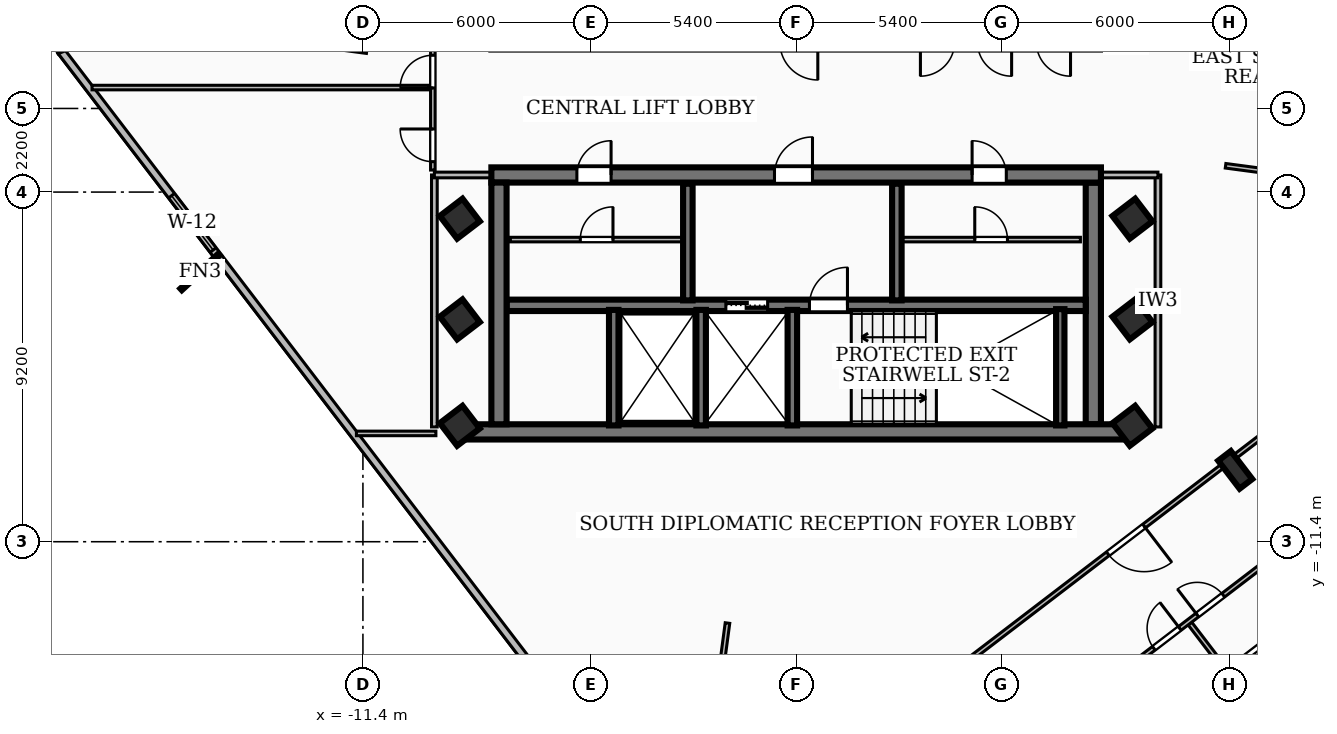
"""IFC4 building model, lengths in metres.
Left out: names, types, materials, properties, quantities, classifications, styles, units other than length and angle.
Written with IfcOpenShell. Run it as: python <this file> out.ifc"""

import sys

from ifc_helpers import new_model, si_unit, direction, frame, frame_2d, origin, origin_2d, place, context, subcontext, project, spatial, rectangle, i_section, extrude, element, fill, save


model = new_model("IFC4")
c1 = context("Model", 3, precision=1e-05, world=origin(), true_north=direction((0.0, 1.0)))
c2 = subcontext(c1, "Body", "Model", "MODEL_VIEW")
j1 = project(units=[si_unit("LENGTHUNIT", "METRE"), si_unit("PLANEANGLEUNIT", "RADIAN")], contexts=[c1])
p1 = place(None, origin())
s1 = spatial("IfcSite", under=j1, at=p1, CompositionType="ELEMENT")
p2 = place(p1, origin())
s2 = spatial("IfcBuilding", under=s1, at=p2, CompositionType="ELEMENT")
p3 = place(p2, frame((0.0, 0.0, 232.56)))
s3 = spatial("IfcBuildingStorey", under=s2, at=p3, CompositionType="ELEMENT", Elevation=232.56)
p4 = place(p3, frame((8.78, -8.51, 0.0), z_axis=(0.0, 0.0, 1.0), x_axis=(-1.0, 0.0, 0.0)))
e1 = element("IfcWall", 1, at=p4, inside=s3, PredefinedType="SHEAR", context=c2, shape_type="SweptSolid", body=[
    extrude(rectangle(XDim=17.56, YDim=0.4, at=frame_2d((8.78, 0.0))), origin(), (0.0, 0.0, 1.0), 3.14),
])
p5 = place(p3, frame((-8.02, -1.75, 0.0), z_axis=(0.0, 0.0, 1.0), x_axis=(1.0, 0.0, 0.0)))
e2 = element("IfcWall", 2, at=p5, inside=s3, PredefinedType="SHEAR", context=c2, shape_type="SweptSolid", body=[
    extrude(rectangle(XDim=16.04, YDim=0.4, at=frame_2d((8.02, 0.0))), origin(), (0.0, 0.0, 1.0), 3.14),
])
p6 = place(p5, frame((7.45, 0.0, 0.0)))
e3 = element("IfcOpeningElement", 3, at=p6, cuts=e2, PredefinedType="OPENING", context=c2, shape_type="SweptSolid", body=[
    extrude(rectangle(XDim=1.0, YDim=2.1, at=frame_2d((0.5, 1.05))), frame((0.0, 0.21, 0.0), z_axis=(0.0, -1.0, 0.0), x_axis=(1.0, 0.0, 0.0)), (0.0, 0.0, 1.0), 0.42),
])
p7 = place(p5, frame((12.65, 0.0, 0.0)))
e4 = element("IfcOpeningElement", 4, at=p7, cuts=e2, PredefinedType="OPENING", context=c2, shape_type="SweptSolid", body=[
    extrude(rectangle(XDim=0.9, YDim=2.06, at=frame_2d((0.45, 1.03))), frame((0.0, 0.21, 0.0), z_axis=(0.0, -1.0, 0.0), x_axis=(1.0, 0.0, 0.0)), (0.0, 0.0, 1.0), 0.42),
])
p8 = place(p5, frame((2.25, 0.0, 0.0)))
e5 = element("IfcOpeningElement", 5, at=p8, cuts=e2, PredefinedType="OPENING", context=c2, shape_type="SweptSolid", body=[
    extrude(rectangle(XDim=0.9, YDim=2.06, at=frame_2d((0.45, 1.03))), frame((0.0, 0.21, 0.0), z_axis=(0.0, -1.0, 0.0), x_axis=(1.0, 0.0, 0.0)), (0.0, 0.0, 1.0), 0.42),
])
for number, where, z_axis, x_axis in (
    (6, (-7.82, -8.31, 0.0), (0.0, 0.0, 1.0), (0.0, 1.0, 0.0)),
    (7, (7.82, -1.95, 0.0), (0.0, 0.0, 1.0), (0.0, -1.0, 0.0)),
):
    element("IfcWall", number, at=place(p3, frame(where, z_axis=z_axis, x_axis=x_axis)), inside=s3, PredefinedType="SHEAR", context=c2, shape_type="SweptSolid", body=[
        extrude(rectangle(XDim=6.36, YDim=0.4, at=frame_2d((3.18, 0.0))), origin(), (0.0, 0.0, 1.0), 3.14),
    ])
p9 = place(p3, frame((-7.62, -5.18, 0.0), z_axis=(0.0, 0.0, 1.0), x_axis=(1.0, 0.0, 0.0)))
e8 = element("IfcWall", 8, at=p9, inside=s3, PredefinedType="SOLIDWALL", context=c2, shape_type="SweptSolid", body=[
    extrude(rectangle(XDim=15.24, YDim=0.3, at=frame_2d((7.62, 0.0))), origin(), (0.0, 0.0, 1.0), 3.14),
])
p10 = place(p9, frame((5.77, 0.0, 0.0)))
e9 = element("IfcOpeningElement", 9, at=p10, cuts=e8, PredefinedType="OPENING", context=c2, shape_type="SweptSolid", body=[
    extrude(rectangle(XDim=1.1, YDim=2.15, at=frame_2d((0.55, 1.075))), frame((0.0, 0.16, 0.0), z_axis=(0.0, -1.0, 0.0), x_axis=(1.0, 0.0, 0.0)), (0.0, 0.0, 1.0), 0.32),
])
p11 = place(p9, frame((7.97, 0.0, 0.0)))
e10 = element("IfcOpeningElement", 10, at=p11, cuts=e8, PredefinedType="OPENING", context=c2, shape_type="SweptSolid", body=[
    extrude(rectangle(XDim=1.0, YDim=2.1, at=frame_2d((0.5, 1.05))), frame((0.0, 0.16, 0.0), z_axis=(0.0, -1.0, 0.0), x_axis=(1.0, 0.0, 0.0)), (0.0, 0.0, 1.0), 0.32),
])
p12 = place(p3, frame((6.95, -8.34, 0.0), z_axis=(0.0, 0.0, 1.0), x_axis=(0.0, 1.0, 0.0)))
e11 = element("IfcWall", 11, at=p12, inside=s3, PredefinedType="SOLIDWALL", context=c2, shape_type="SweptSolid", body=[
    extrude(rectangle(XDim=3.06, YDim=0.22, at=frame_2d((1.53, 0.0))), origin(), (0.0, 0.0, 1.0), 3.14),
])
for number, where, z_axis, x_axis in (
    (12, (-0.1, -8.34, 0.0), (0.0, 0.0, 1.0), (0.0, 1.0, 0.0)),
    (13, (-2.5, -8.34, 0.0), (0.0, 0.0, 1.0), (0.0, 1.0, 0.0)),
    (14, (-4.8, -8.34, 0.0), (0.0, 0.0, 1.0), (0.0, 1.0, 0.0)),
):
    element("IfcWall", number, at=place(p3, frame(where, z_axis=z_axis, x_axis=x_axis)), inside=s3, PredefinedType="SOLIDWALL", context=c2, shape_type="SweptSolid", body=[
        extrude(rectangle(XDim=3.04, YDim=0.25, at=frame_2d((1.52, 0.0))), origin(), (0.0, 0.0, 1.0), 3.14),
    ])
for number, where, z_axis, x_axis in (
    (15, (-2.85, -5.05, 0.0), (0.0, 0.0, 1.0), (0.0, 1.0, 0.0)),
    (16, (2.65, -5.05, 0.0), (0.0, 0.0, 1.0), (0.0, 1.0, 0.0)),
):
    element("IfcWall", number, at=place(p3, frame(where, z_axis=z_axis, x_axis=x_axis)), inside=s3, PredefinedType="SOLIDWALL", context=c2, shape_type="SweptSolid", body=[
        extrude(rectangle(XDim=3.07, YDim=0.25, at=frame_2d((1.535, 0.0))), origin(), (0.0, 0.0, 1.0), 3.14),
    ])
for number, where, z_axis, x_axis in (
    (17, (-8.85, -5.55, 0.0), (0.0, 0.0, 1.0), (0.794, 0.607, 0.0)),
    (18, (-8.85, -2.9, 0.0), (0.0, 0.0, 1.0), (0.794, 0.607, 0.0)),
    (19, (8.85, -5.55, 0.0), (0.0, 0.0, 1.0), (0.794, 0.607, 0.0)),
    (20, (8.85, -2.9, 0.0), (0.0, 0.0, 1.0), (0.794, 0.607, 0.0)),
    (21, (8.85, -8.35, 0.0), (0.0, 0.0, 1.0), (0.794, 0.607, 0.0)),
    (22, (-8.85, -8.35, 0.0), (0.0, 0.0, 1.0), (0.794, 0.607, 0.0)),
):
    element("IfcColumn", number, at=place(p3, frame(where, z_axis=z_axis, x_axis=x_axis)), inside=s3, PredefinedType="COLUMN", context=c2, shape_type="SweptSolid", body=[
        extrude(rectangle(XDim=0.75, YDim=0.75, at=origin_2d()), origin(), (0.0, 0.0, 1.0), 3.42),
    ])
p13 = place(p3, frame((11.554, -9.51, 0.0), z_axis=(0.0, 0.0, 1.0), x_axis=(0.794414620535, 0.607375839723, 0.0)))
e23 = element("IfcColumn", 23, at=p13, inside=s3, PredefinedType="COLUMN", context=c2, shape_type="SweptSolid", body=[
    extrude(i_section(OverallWidth=0.418, OverallDepth=0.927, WebThickness=0.019, FlangeThickness=0.032, at=origin_2d()), origin(), (0.0, 0.0, 1.0), 3.42),
])
p14 = place(p3, frame((-3.607, -19.074, 0.0), z_axis=(0.0, 0.0, 1.0), x_axis=(-0.607353275552, 0.794431871639, 0.0)))
e24 = element("IfcWall", 24, at=p14, inside=s3, PredefinedType="SOLIDWALL", context=c2, shape_type="SweptSolid", body=[
    extrude(rectangle(XDim=25.924, YDim=0.2, at=frame_2d((12.962, 0.0))), origin(), (0.0, 0.0, 1.0), 3.14),
])
p15 = place(p14, frame((19.321, 0.0, 0.85)))
e25 = element("IfcOpeningElement", 25, at=p15, cuts=e24, PredefinedType="OPENING", context=c2, shape_type="SweptSolid", body=[
    extrude(rectangle(XDim=1.8, YDim=1.6, at=frame_2d((0.9, 0.8))), frame((0.0, 0.11, 0.0), z_axis=(0.0, -1.0, 0.0), x_axis=(1.0, 0.0, 0.0)), (0.0, 0.0, 1.0), 0.22),
])
p16 = place(p3, frame((-19.327, 1.478, 0.0), z_axis=(0.0, 0.0, 1.0), x_axis=(-0.382171551451, 0.924091394431, 0.0)))
e26 = element("IfcWall", 26, at=p16, inside=s3, PredefinedType="SOLIDWALL", context=c2, shape_type="SweptSolid", body=[
    extrude(rectangle(XDim=0.837, YDim=0.2, at=frame_2d((0.419, 0.0))), origin(), (0.0, 0.0, 1.0), 3.14),
])
p17 = place(p3, frame((16.274, -13.363, 0.0), z_axis=(0.0, 0.0, 1.0), x_axis=(-0.794458044917, -0.607319038781, 0.0)))
e27 = element("IfcWall", 27, at=p17, inside=s3, PredefinedType="SOLIDWALL", context=c2, shape_type="SweptSolid", body=[
    extrude(rectangle(XDim=10.164, YDim=0.2, at=frame_2d((5.082, 0.0))), origin(), (0.0, 0.0, 1.0), 3.14),
])
p18 = place(p17, frame((6.878, 0.0, 0.85)))
e28 = element("IfcOpeningElement", 28, at=p18, cuts=e27, PredefinedType="OPENING", context=c2, shape_type="SweptSolid", body=[
    extrude(rectangle(XDim=2.1, YDim=2.0, at=frame_2d((1.05, 1.0))), frame((0.0, 0.11, 0.0), z_axis=(0.0, -1.0, 0.0), x_axis=(1.0, 0.0, 0.0)), (0.0, 0.0, 1.0), 0.22),
])
p19 = place(p3, frame((2.8, -3.45, 0.0), z_axis=(0.0, 0.0, 1.0), x_axis=(1.0, 0.0, 0.0)))
e29 = element("IfcWall", 29, at=p19, inside=s3, PredefinedType="PARTITIONING", context=c2, shape_type="SweptSolid", body=[
    extrude(rectangle(XDim=4.68, YDim=0.12, at=frame_2d((2.34, 0.0))), origin(), (0.0, 0.0, 1.0), 3.14),
])
p20 = place(p19, frame((1.9, 0.0, 0.0)))
e30 = element("IfcOpeningElement", 30, at=p20, cuts=e29, PredefinedType="OPENING", context=c2, shape_type="SweptSolid", body=[
    extrude(rectangle(XDim=0.86, YDim=2.04, at=frame_2d((0.43, 1.02))), frame((0.0, 0.07, 0.0), z_axis=(0.0, -1.0, 0.0), x_axis=(1.0, 0.0, 0.0)), (0.0, 0.0, 1.0), 0.14),
])
p21 = place(p3, frame((-7.52, -3.45, 0.0), z_axis=(0.0, 0.0, 1.0), x_axis=(1.0, 0.0, 0.0)))
e31 = element("IfcWall", 31, at=p21, inside=s3, PredefinedType="PARTITIONING", context=c2, shape_type="SweptSolid", body=[
    extrude(rectangle(XDim=4.54, YDim=0.12, at=frame_2d((2.27, 0.0))), origin(), (0.0, 0.0, 1.0), 3.14),
])
p22 = place(p21, frame((1.84, 0.0, 0.0)))
e32 = element("IfcOpeningElement", 32, at=p22, cuts=e31, PredefinedType="OPENING", context=c2, shape_type="SweptSolid", body=[
    extrude(rectangle(XDim=0.86, YDim=2.04, at=frame_2d((0.43, 1.02))), frame((0.0, 0.07, 0.0), z_axis=(0.0, -1.0, 0.0), x_axis=(1.0, 0.0, 0.0)), (0.0, 0.0, 1.0), 0.14),
])
p23 = place(p3, frame((-9.52, -8.38, 0.0), z_axis=(0.0, 0.0, 1.0), x_axis=(0.0, 1.0, 0.0)))
e33 = element("IfcWall", 33, at=p23, inside=s3, PredefinedType="PARTITIONING", context=c2, shape_type="SweptSolid", body=[
    extrude(rectangle(XDim=6.63, YDim=0.15, at=frame_2d((3.315, 0.0))), origin(), (0.0, 0.0, 1.0), 3.14),
])
p24 = place(p3, frame((-7.85, -1.75, 0.0), z_axis=(0.0, 0.0, 1.0), x_axis=(-1.0, 0.0, 0.0)))
e34 = element("IfcWall", 34, at=p24, inside=s3, PredefinedType="PARTITIONING", context=c2, shape_type="SweptSolid", body=[
    extrude(rectangle(XDim=1.67, YDim=0.15, at=frame_2d((0.835, 0.0))), origin(), (0.0, 0.0, 1.0), 2.37),
])
p25 = place(p3, frame((9.52, -8.38, 0.0), z_axis=(0.0, 0.0, 1.0), x_axis=(0.0, 1.0, 0.0)))
e35 = element("IfcWall", 35, at=p25, inside=s3, PredefinedType="PARTITIONING", context=c2, shape_type="SweptSolid", body=[
    extrude(rectangle(XDim=6.63, YDim=0.15, at=frame_2d((3.315, 0.0))), origin(), (0.0, 0.0, 1.0), 3.14),
])
p26 = place(p3, frame((7.85, -1.75, 0.0), z_axis=(0.0, 0.0, 1.0), x_axis=(1.0, 0.0, 0.0)))
e36 = element("IfcWall", 36, at=p26, inside=s3, PredefinedType="PARTITIONING", context=c2, shape_type="SweptSolid", body=[
    extrude(rectangle(XDim=1.67, YDim=0.15, at=frame_2d((0.835, 0.0))), origin(), (0.0, 0.0, 1.0), 2.37),
])
p27 = place(p3, frame((-18.528, 0.55, 0.0), z_axis=(0.0, 0.0, 1.0), x_axis=(1.0, 0.0, 0.0)))
e37 = element("IfcWall", 37, at=p27, inside=s3, PredefinedType="PARTITIONING", context=c2, shape_type="SweptSolid", body=[
    extrude(rectangle(XDim=8.868, YDim=0.12, at=frame_2d((4.434, 0.0))), origin(), (0.0, 0.0, 1.0), 3.14),
])
p28 = place(p3, frame((-11.571, -8.55, 0.0), z_axis=(0.0, 0.0, 1.0), x_axis=(1.0, 0.0, 0.0)))
e38 = element("IfcWall", 38, at=p28, inside=s3, PredefinedType="PARTITIONING", context=c2, shape_type="SweptSolid", body=[
    extrude(rectangle(XDim=2.091, YDim=0.12, at=frame_2d((1.045, 0.0))), origin(), (0.0, 0.0, 1.0), 3.14),
])
p29 = place(p3, frame((-9.56, -1.62, 0.0), z_axis=(0.0, 0.0, 1.0), x_axis=(0.0, 1.0, 0.0)))
e39 = element("IfcWall", 39, at=p29, inside=s3, PredefinedType="PARTITIONING", context=c2, shape_type="SweptSolid", body=[
    extrude(rectangle(XDim=3.24, YDim=0.12, at=frame_2d((1.62, 0.0))), origin(), (0.0, 0.0, 1.0), 3.14),
])
p30 = place(p29, frame((0.22, 0.0, 0.0)))
e40 = element("IfcOpeningElement", 40, at=p30, cuts=e39, PredefinedType="OPENING", context=c2, shape_type="SweptSolid", body=[
    extrude(rectangle(XDim=0.86, YDim=2.04, at=frame_2d((0.43, 1.02))), frame((0.0, 0.07, 0.0), z_axis=(0.0, -1.0, 0.0), x_axis=(1.0, 0.0, 0.0)), (0.0, 0.0, 1.0), 0.14),
])
p31 = place(p29, frame((2.16, 0.0, 0.0)))
e41 = element("IfcOpeningElement", 41, at=p31, cuts=e39, PredefinedType="OPENING", context=c2, shape_type="SweptSolid", body=[
    extrude(rectangle(XDim=0.86, YDim=2.04, at=frame_2d((0.43, 1.02))), frame((0.0, 0.07, 0.0), z_axis=(0.0, -1.0, 0.0), x_axis=(1.0, 0.0, 0.0)), (0.0, 0.0, 1.0), 0.14),
])
p32 = place(p3, frame((-11.3, 1.508, 0.0), z_axis=(0.0, 0.0, 1.0), x_axis=(-0.99121735818, 0.132242764804, 0.0)))
e42 = element("IfcWall", 42, at=p32, inside=s3, PredefinedType="PARTITIONING", context=c2, shape_type="SweptSolid", body=[
    extrude(rectangle(XDim=8.295, YDim=0.12, at=frame_2d((4.147, 0.0))), origin(), (0.0, 0.0, 1.0), 3.14),
])
p33 = place(p3, frame((-1.807, -13.54, 0.0), z_axis=(0.0, 0.0, 1.0), x_axis=(-0.132245865303, -0.991216944523, 0.0)))
e43 = element("IfcWall", 43, at=p33, inside=s3, PredefinedType="PARTITIONING", context=c2, shape_type="SweptSolid", body=[
    extrude(rectangle(XDim=6.035, YDim=0.12, at=frame_2d((3.018, 0.0))), origin(), (0.0, 0.0, 1.0), 3.14),
])
p34 = place(p3, frame((11.3, -1.508, 0.0), z_axis=(0.0, 0.0, 1.0), x_axis=(0.99121735818, -0.132242764804, 0.0)))
e44 = element("IfcWall", 44, at=p34, inside=s3, PredefinedType="PARTITIONING", context=c2, shape_type="SweptSolid", body=[
    extrude(rectangle(XDim=8.295, YDim=0.12, at=frame_2d((4.147, 0.0))), origin(), (0.0, 0.0, 1.0), 3.14),
])
p35 = place(p3, frame((17.012, 1.275, 0.0), z_axis=(0.0, 0.0, 1.0), x_axis=(-0.60728139249, 0.794486822003, 0.0)))
e45 = element("IfcWall", 45, at=p35, inside=s3, PredefinedType="PARTITIONING", context=c2, shape_type="SweptSolid", body=[
    extrude(rectangle(XDim=7.95, YDim=0.12, at=frame_2d((3.975, 0.0))), origin(), (0.0, 0.0, 1.0), 3.14),
])
p36 = place(p3, frame((17.068, -4.939, 0.0), z_axis=(0.0, 0.0, 1.0), x_axis=(-0.794433927634, -0.607350586255, 0.0)))
e46 = element("IfcWall", 46, at=p36, inside=s3, PredefinedType="PARTITIONING", context=c2, shape_type="SweptSolid", body=[
    extrude(rectangle(XDim=20.58, YDim=0.12, at=frame_2d((10.29, 0.0))), origin(), (0.0, 0.0, 1.0), 2.51),
])
p37 = place(p36, frame((9.96, 0.0, 0.0)))
e47 = element("IfcOpeningElement", 47, at=p37, cuts=e46, PredefinedType="OPENING", context=c2, shape_type="SweptSolid", body=[
    extrude(rectangle(XDim=1.2, YDim=2.1, at=frame_2d((0.6, 1.05))), frame((0.0, 0.07, 0.0), z_axis=(0.0, -1.0, 0.0), x_axis=(1.0, 0.0, 0.0)), (0.0, 0.0, 1.0), 0.14),
])
p38 = place(p3, frame((10.362, -13.553, 0.0), z_axis=(0.0, 0.0, 1.0), x_axis=(0.6073553069, -0.794430318644, 0.0)))
e48 = element("IfcWall", 48, at=p38, inside=s3, PredefinedType="PARTITIONING", context=c2, shape_type="SweptSolid", body=[
    extrude(rectangle(XDim=1.53, YDim=0.12, at=frame_2d((0.765, 0.0))), origin(), (0.0, 0.0, 1.0), 3.14),
])
p39 = place(p3, frame((4.943, -17.62, 0.0), z_axis=(0.0, 0.0, 1.0), x_axis=(0.79442653656, 0.607360253893, 0.0)))
e49 = element("IfcWall", 49, at=p39, inside=s3, PredefinedType="PARTITIONING", context=c2, shape_type="SweptSolid", body=[
    extrude(rectangle(XDim=13.01, YDim=0.12, at=frame_2d((6.505, 0.0))), origin(), (0.0, 0.0, 1.0), 3.14),
])
p40 = place(p39, frame((5.625, 0.0, 0.0)))
e50 = element("IfcOpeningElement", 50, at=p40, cuts=e49, PredefinedType="OPENING", context=c2, shape_type="SweptSolid", body=[
    extrude(rectangle(XDim=0.86, YDim=2.04, at=frame_2d((0.43, 1.02))), frame((0.0, 0.07, 0.0), z_axis=(0.0, -1.0, 0.0), x_axis=(1.0, 0.0, 0.0)), (0.0, 0.0, 1.0), 0.14),
])
p41 = place(p39, frame((7.065, 0.0, 0.0)))
e51 = element("IfcOpeningElement", 51, at=p41, cuts=e49, PredefinedType="OPENING", context=c2, shape_type="SweptSolid", body=[
    extrude(rectangle(XDim=0.86, YDim=2.04, at=frame_2d((0.43, 1.02))), frame((0.0, 0.07, 0.0), z_axis=(0.0, -1.0, 0.0), x_axis=(1.0, 0.0, 0.0)), (0.0, 0.0, 1.0), 0.14),
])
p42 = place(p3, frame((16.281, -11.029, 0.0), z_axis=(0.0, 0.0, 1.0), x_axis=(-0.794435590649, -0.607348410973, 0.0)))
e52 = element("IfcWall", 52, at=p42, inside=s3, PredefinedType="PARTITIONING", context=c2, shape_type="SweptSolid", body=[
    extrude(rectangle(XDim=13.01, YDim=0.12, at=frame_2d((6.505, 0.0))), origin(), (0.0, 0.0, 1.0), 3.14),
])
p43 = place(p42, frame((4.96, 0.0, 0.0)))
e53 = element("IfcOpeningElement", 53, at=p43, cuts=e52, PredefinedType="OPENING", context=c2, shape_type="SweptSolid", body=[
    extrude(rectangle(XDim=1.3, YDim=2.1, at=frame_2d((0.65, 1.05))), frame((0.0, 0.07, 0.0), z_axis=(0.0, -1.0, 0.0), x_axis=(1.0, 0.0, 0.0)), (0.0, 0.0, 1.0), 0.14),
])
p44 = place(p15, origin())
e54 = element("IfcWindow", 54, at=p44, inside=s3, PartitioningType="SINGLE_PANEL", PredefinedType="WINDOW", context=c2, shape_type="SweptSolid", body=[
    extrude(rectangle(XDim=1.8, YDim=1.6, at=frame_2d((0.9, 0.8))), frame((0.0, 0.03, 0.0), z_axis=(0.0, -1.0, 0.0), x_axis=(1.0, 0.0, 0.0)), (0.0, 0.0, 1.0), 0.06),
])
fill(e25, e54)
p45 = place(p6, origin())
e55 = element("IfcDoor", 55, at=p45, inside=s3, OperationType="SINGLE_SWING_RIGHT", PredefinedType="DOOR", context=c2, shape_type="SweptSolid", body=[
    extrude(rectangle(XDim=1.0, YDim=2.1, at=frame_2d((0.5, 1.05))), frame((0.0, 0.025, 0.0), z_axis=(0.0, -1.0, 0.0), x_axis=(1.0, 0.0, 0.0)), (0.0, 0.0, 1.0), 0.05),
])
fill(e3, e55)
p46 = place(p10, origin())
e56 = element("IfcDoor", 56, at=p46, inside=s3, OperationType="DOUBLE_DOOR_SLIDING", PredefinedType="DOOR", context=c2, shape_type="SweptSolid", body=[
    extrude(rectangle(XDim=1.1, YDim=2.15, at=frame_2d((0.55, 1.075))), frame((0.0, 0.025, 0.0), z_axis=(0.0, -1.0, 0.0), x_axis=(1.0, 0.0, 0.0)), (0.0, 0.0, 1.0), 0.05),
])
fill(e9, e56)
p47 = place(p11, origin())
e57 = element("IfcDoor", 57, at=p47, inside=s3, OperationType="SINGLE_SWING_RIGHT", PredefinedType="DOOR", context=c2, shape_type="SweptSolid", body=[
    extrude(rectangle(XDim=1.0, YDim=2.1, at=frame_2d((0.5, 1.05))), frame((0.0, 0.025, 0.0), z_axis=(0.0, -1.0, 0.0), x_axis=(1.0, 0.0, 0.0)), (0.0, 0.0, 1.0), 0.05),
])
fill(e10, e57)
p48 = place(p7, origin())
e58 = element("IfcDoor", 58, at=p48, inside=s3, OperationType="SINGLE_SWING_LEFT", PredefinedType="DOOR", context=c2, shape_type="SweptSolid", body=[
    extrude(rectangle(XDim=0.9, YDim=2.06, at=frame_2d((0.45, 1.03))), frame((0.0, 0.025, 0.0), z_axis=(0.0, -1.0, 0.0), x_axis=(1.0, 0.0, 0.0)), (0.0, 0.0, 1.0), 0.05),
])
fill(e4, e58)
p49 = place(p8, origin())
e59 = element("IfcDoor", 59, at=p49, inside=s3, OperationType="SINGLE_SWING_RIGHT", PredefinedType="DOOR", context=c2, shape_type="SweptSolid", body=[
    extrude(rectangle(XDim=0.9, YDim=2.06, at=frame_2d((0.45, 1.03))), frame((0.0, 0.025, 0.0), z_axis=(0.0, -1.0, 0.0), x_axis=(1.0, 0.0, 0.0)), (0.0, 0.0, 1.0), 0.05),
])
fill(e5, e59)
p50 = place(p20, origin())
e60 = element("IfcDoor", 60, at=p50, inside=s3, OperationType="SINGLE_SWING_LEFT", PredefinedType="DOOR", context=c2, shape_type="SweptSolid", body=[
    extrude(rectangle(XDim=0.86, YDim=2.04, at=frame_2d((0.43, 1.02))), frame((0.0, 0.025, 0.0), z_axis=(0.0, -1.0, 0.0), x_axis=(1.0, 0.0, 0.0)), (0.0, 0.0, 1.0), 0.05),
])
fill(e30, e60)
p51 = place(p22, origin())
e61 = element("IfcDoor", 61, at=p51, inside=s3, OperationType="SINGLE_SWING_RIGHT", PredefinedType="DOOR", context=c2, shape_type="SweptSolid", body=[
    extrude(rectangle(XDim=0.86, YDim=2.04, at=frame_2d((0.43, 1.02))), frame((0.0, 0.025, 0.0), z_axis=(0.0, -1.0, 0.0), x_axis=(1.0, 0.0, 0.0)), (0.0, 0.0, 1.0), 0.05),
])
fill(e32, e61)
p52 = place(p30, origin())
e62 = element("IfcDoor", 62, at=p52, inside=s3, OperationType="SINGLE_SWING_RIGHT", PredefinedType="DOOR", context=c2, shape_type="SweptSolid", body=[
    extrude(rectangle(XDim=0.86, YDim=2.04, at=frame_2d((0.43, 1.02))), frame((0.0, 0.025, 0.0), z_axis=(0.0, -1.0, 0.0), x_axis=(1.0, 0.0, 0.0)), (0.0, 0.0, 1.0), 0.05),
])
fill(e40, e62)
p53 = place(p31, origin())
e63 = element("IfcDoor", 63, at=p53, inside=s3, OperationType="SINGLE_SWING_LEFT", PredefinedType="DOOR", context=c2, shape_type="SweptSolid", body=[
    extrude(rectangle(XDim=0.86, YDim=2.04, at=frame_2d((0.43, 1.02))), frame((0.0, 0.025, 0.0), z_axis=(0.0, -1.0, 0.0), x_axis=(1.0, 0.0, 0.0)), (0.0, 0.0, 1.0), 0.05),
])
fill(e41, e63)
p54 = place(p37, origin())
e64 = element("IfcDoor", 64, at=p54, inside=s3, OperationType="SINGLE_SWING_LEFT", PredefinedType="DOOR", context=c2, shape_type="SweptSolid", body=[
    extrude(rectangle(XDim=1.2, YDim=2.1, at=frame_2d((0.6, 1.05))), frame((0.0, 0.025, 0.0), z_axis=(0.0, -1.0, 0.0), x_axis=(1.0, 0.0, 0.0)), (0.0, 0.0, 1.0), 0.05),
])
fill(e47, e64)
p55 = place(p40, origin())
e65 = element("IfcDoor", 65, at=p55, inside=s3, OperationType="SINGLE_SWING_RIGHT", PredefinedType="DOOR", context=c2, shape_type="SweptSolid", body=[
    extrude(rectangle(XDim=0.86, YDim=2.04, at=frame_2d((0.43, 1.02))), frame((0.0, 0.025, 0.0), z_axis=(0.0, -1.0, 0.0), x_axis=(1.0, 0.0, 0.0)), (0.0, 0.0, 1.0), 0.05),
])
fill(e50, e65)
p56 = place(p41, origin())
e66 = element("IfcDoor", 66, at=p56, inside=s3, OperationType="SINGLE_SWING_LEFT", PredefinedType="DOOR", context=c2, shape_type="SweptSolid", body=[
    extrude(rectangle(XDim=0.86, YDim=2.04, at=frame_2d((0.43, 1.02))), frame((0.0, 0.025, 0.0), z_axis=(0.0, -1.0, 0.0), x_axis=(1.0, 0.0, 0.0)), (0.0, 0.0, 1.0), 0.05),
])
fill(e51, e66)
p57 = place(p43, origin())
e67 = element("IfcDoor", 67, at=p57, inside=s3, OperationType="SINGLE_SWING_LEFT", PredefinedType="DOOR", context=c2, shape_type="SweptSolid", body=[
    extrude(rectangle(XDim=1.3, YDim=2.1, at=frame_2d((0.65, 1.05))), frame((0.0, 0.025, 0.0), z_axis=(0.0, -1.0, 0.0), x_axis=(1.0, 0.0, 0.0)), (0.0, 0.0, 1.0), 0.05),
])
fill(e53, e67)
save(model, sys.argv[1])
